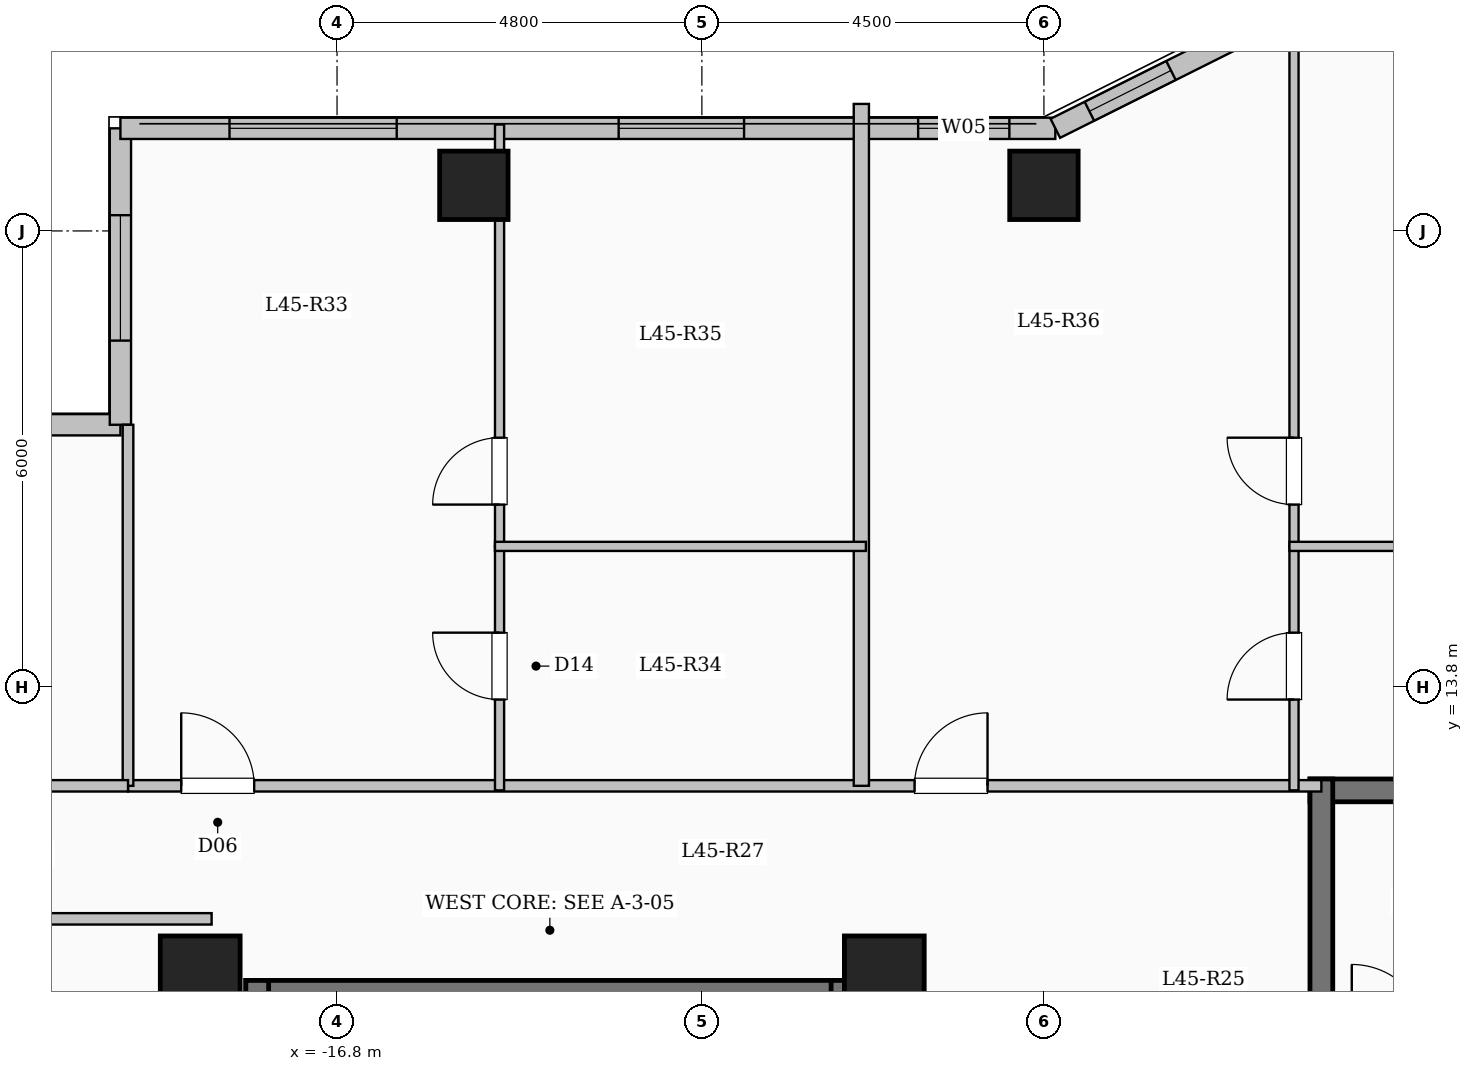
"""IFC4 building model, lengths in metres.
Left out: names, types, materials, properties, quantities, classifications, styles, units other than length and angle.
Written with IfcOpenShell. Run it as: python <this file> out.ifc"""

import sys

from ifc_helpers import new_model, si_unit, direction, frame, frame_2d, origin, origin_2d, place, context, subcontext, project, spatial, rectangle, extrude, element, fill, save


model = new_model("IFC4")
c1 = context("Model", 3, precision=1e-05, world=origin(), true_north=direction((0.0, 1.0)))
c2 = subcontext(c1, "Body", "Model", "MODEL_VIEW")
j1 = project(units=[si_unit("LENGTHUNIT", "METRE"), si_unit("PLANEANGLEUNIT", "RADIAN")], contexts=[c1])
p1 = place(None, origin())
s1 = spatial("IfcSite", under=j1, at=p1, CompositionType="ELEMENT")
p2 = place(p1, origin())
s2 = spatial("IfcBuilding", under=s1, at=p2, CompositionType="ELEMENT")
p3 = place(p2, frame((0.0, 0.0, 166.1)))
s3 = spatial("IfcBuildingStorey", under=s2, at=p3, CompositionType="ELEMENT", Elevation=166.1)
for number, where, z_axis, x_axis in (
    (1, (-9.6, 10.0, 0.0), (0.0, 0.0, 1.0), (1.0, 0.0, 0.0)),
    (2, (-18.6, 10.0, 0.0), (0.0, 0.0, 1.0), (1.0, 0.0, 0.0)),
):
    element("IfcColumn", number, at=place(p3, frame(where, z_axis=z_axis, x_axis=x_axis)), inside=s3, PredefinedType="COLUMN", context=c2, shape_type="SweptSolid", body=[
        extrude(rectangle(XDim=1.05, YDim=1.05, at=origin_2d()), origin(), (0.0, 0.0, 1.0), 3.35),
    ])
for number, where, z_axis, x_axis in (
    (3, (-15.0, 20.4, 0.0), (0.0, 0.0, 1.0), (1.0, 0.0, 0.0)),
    (4, (-7.5, 20.4, 0.0), (0.0, 0.0, 1.0), (1.0, 0.0, 0.0)),
):
    element("IfcColumn", number, at=place(p3, frame(where, z_axis=z_axis, x_axis=x_axis)), inside=s3, PredefinedType="COLUMN", context=c2, shape_type="SweptSolid", body=[
        extrude(rectangle(XDim=0.9, YDim=0.9, at=origin_2d()), origin(), (0.0, 0.0, 1.0), 3.35),
    ])
p4 = place(p3, frame((-25.05, 17.25, 0.0), z_axis=(0.0, 0.0, 1.0), x_axis=(1.0, 0.0, 0.0)))
e5 = element("IfcWall", 5, at=p4, inside=s3, PredefinedType="SOLIDWALL", context=c2, shape_type="SweptSolid", body=[
    extrude(rectangle(XDim=5.4, YDim=0.28, at=frame_2d((2.7, 0.0))), origin(), (0.0, 0.0, 1.0), 3.1),
])
p5 = place(p4, frame((1.725, 0.0, 0.9)))
e6 = element("IfcOpeningElement", 6, at=p5, cuts=e5, PredefinedType="OPENING", context=c2, shape_type="SweptSolid", body=[
    extrude(rectangle(XDim=2.0, YDim=1.7, at=frame_2d((1.0, 0.85))), frame((0.0, 0.15, 0.0), z_axis=(0.0, -1.0, 0.0), x_axis=(1.0, 0.0, 0.0)), (0.0, 0.0, 1.0), 0.3),
])
p6 = place(p3, frame((-19.65, 17.25, 0.0), z_axis=(0.0, 0.0, 1.0), x_axis=(0.0, 1.0, 0.0)))
e7 = element("IfcWall", 7, at=p6, inside=s3, PredefinedType="SOLIDWALL", context=c2, shape_type="SweptSolid", body=[
    extrude(rectangle(XDim=3.9, YDim=0.28, at=frame_2d((1.95, 0.0))), origin(), (0.0, 0.0, 1.0), 3.1),
])
p7 = place(p6, frame((1.107, 0.0, 0.9)))
e8 = element("IfcOpeningElement", 8, at=p7, cuts=e7, PredefinedType="OPENING", context=c2, shape_type="SweptSolid", body=[
    extrude(rectangle(XDim=1.65, YDim=1.6, at=frame_2d((0.825, 0.8))), frame((0.0, 0.15, 0.0), z_axis=(0.0, -1.0, 0.0), x_axis=(1.0, 0.0, 0.0)), (0.0, 0.0, 1.0), 0.3),
])
p8 = place(p3, frame((-19.65, 21.15, 0.0), z_axis=(0.0, 0.0, 1.0), x_axis=(1.0, 0.0, 0.0)))
e9 = element("IfcWall", 9, at=p8, inside=s3, PredefinedType="SOLIDWALL", context=c2, shape_type="SweptSolid", body=[
    extrude(rectangle(XDim=12.3, YDim=0.28, at=frame_2d((6.15, 0.0))), origin(), (0.0, 0.0, 1.0), 3.1),
])
p9 = place(p8, frame((1.435, 0.0, 0.9)))
e10 = element("IfcOpeningElement", 10, at=p9, cuts=e9, PredefinedType="OPENING", context=c2, shape_type="SweptSolid", body=[
    extrude(rectangle(XDim=2.2, YDim=1.75, at=frame_2d((1.1, 0.875))), frame((0.0, 0.15, 0.0), z_axis=(0.0, -1.0, 0.0), x_axis=(1.0, 0.0, 0.0)), (0.0, 0.0, 1.0), 0.3),
])
p10 = place(p8, frame((6.555, 0.0, 0.9)))
e11 = element("IfcOpeningElement", 11, at=p10, cuts=e9, PredefinedType="OPENING", context=c2, shape_type="SweptSolid", body=[
    extrude(rectangle(XDim=1.65, YDim=1.6, at=frame_2d((0.825, 0.8))), frame((0.0, 0.15, 0.0), z_axis=(0.0, -1.0, 0.0), x_axis=(1.0, 0.0, 0.0)), (0.0, 0.0, 1.0), 0.3),
])
p11 = place(p8, frame((10.495, 0.0, 0.95)))
e12 = element("IfcOpeningElement", 12, at=p11, cuts=e9, PredefinedType="OPENING", context=c2, shape_type="SweptSolid", body=[
    extrude(rectangle(XDim=1.2, YDim=1.5, at=frame_2d((0.6, 0.75))), frame((0.0, 0.15, 0.0), z_axis=(0.0, -1.0, 0.0), x_axis=(1.0, 0.0, 0.0)), (0.0, 0.0, 1.0), 0.3),
])
p12 = place(p3, frame((-7.35, 21.15, 0.0), z_axis=(0.0, 0.0, 1.0), x_axis=(0.894427191, 0.4472135955, 0.0)))
e13 = element("IfcWall", 13, at=p12, inside=s3, PredefinedType="SOLIDWALL", context=c2, shape_type="SweptSolid", body=[
    extrude(rectangle(XDim=3.354, YDim=0.28, at=frame_2d((1.677, 0.0))), origin(), (0.0, 0.0, 1.0), 3.1),
])
p13 = place(p12, frame((0.501, 0.0, 0.95)))
e14 = element("IfcOpeningElement", 14, at=p13, cuts=e13, PredefinedType="OPENING", context=c2, shape_type="SweptSolid", body=[
    extrude(rectangle(XDim=1.2, YDim=1.5, at=frame_2d((0.6, 0.75))), frame((0.0, 0.15, 0.0), z_axis=(0.0, -1.0, 0.0), x_axis=(1.0, 0.0, 0.0)), (0.0, 0.0, 1.0), 0.3),
])
p14 = place(p3, frame((-18.0, 9.79, 0.0), z_axis=(0.0, 0.0, 1.0), x_axis=(1.0, 0.0, 0.0)))
e15 = element("IfcWall", 15, at=p14, inside=s3, PredefinedType="SHEAR", context=c2, shape_type="SweptSolid", body=[
    extrude(rectangle(XDim=8.0, YDim=0.3, at=frame_2d((4.0, 0.0))), origin(), (0.0, 0.0, 1.0), 3.35),
])
for number, where, z_axis, x_axis in (
    (16, (-17.85, 6.35, 0.0), (0.0, 0.0, 1.0), (0.0, 1.0, 0.0)),
    (17, (-10.15, 6.35, 0.0), (0.0, 0.0, 1.0), (0.0, 1.0, 0.0)),
):
    element("IfcWall", number, at=place(p3, frame(where, z_axis=z_axis, x_axis=x_axis)), inside=s3, PredefinedType="SHEAR", context=c2, shape_type="SweptSolid", body=[
        extrude(rectangle(XDim=3.59, YDim=0.3, at=frame_2d((1.795, 0.0))), origin(), (0.0, 0.0, 1.0), 3.35),
    ])
p15 = place(p3, frame((-4.0, 12.44, 0.0), z_axis=(0.0, 0.0, 1.0), x_axis=(1.0, 0.0, 0.0)))
e18 = element("IfcWall", 18, at=p15, inside=s3, PredefinedType="SHEAR", context=c2, shape_type="SweptSolid", body=[
    extrude(rectangle(XDim=8.0, YDim=0.3, at=frame_2d((4.0, 0.0))), origin(), (0.0, 0.0, 1.0), 3.35),
])
p16 = place(p3, frame((-3.85, 9.0, 0.0), z_axis=(0.0, 0.0, 1.0), x_axis=(0.0, 1.0, 0.0)))
e19 = element("IfcWall", 19, at=p16, inside=s3, PredefinedType="SHEAR", context=c2, shape_type="SweptSolid", body=[
    extrude(rectangle(XDim=3.59, YDim=0.3, at=frame_2d((1.795, 0.0))), origin(), (0.0, 0.0, 1.0), 3.35),
])
p17 = place(p3, frame((-19.55, 12.5, 0.0), z_axis=(0.0, 0.0, 1.0), x_axis=(1.0, 0.0, 0.0)))
e20 = element("IfcWall", 20, at=p17, inside=s3, PredefinedType="PARTITIONING", context=c2, shape_type="SweptSolid", body=[
    extrude(rectangle(XDim=15.7, YDim=0.15, at=frame_2d((7.85, 0.0))), origin(), (0.0, 0.0, 1.0), 3.1),
])
p18 = place(p17, frame((0.7, 0.0, 0.0)))
e21 = element("IfcOpeningElement", 21, at=p18, cuts=e20, PredefinedType="OPENING", context=c2, shape_type="SweptSolid", body=[
    extrude(rectangle(XDim=0.96, YDim=2.15, at=frame_2d((0.48, 1.075))), frame((0.0, 0.085, 0.0), z_axis=(0.0, -1.0, 0.0), x_axis=(1.0, 0.0, 0.0)), (0.0, 0.0, 1.0), 0.17),
])
p19 = place(p17, frame((10.348, 0.0, 0.0)))
e22 = element("IfcOpeningElement", 22, at=p19, cuts=e20, PredefinedType="OPENING", context=c2, shape_type="SweptSolid", body=[
    extrude(rectangle(XDim=0.96, YDim=2.15, at=frame_2d((0.48, 1.075))), frame((0.0, 0.085, 0.0), z_axis=(0.0, -1.0, 0.0), x_axis=(1.0, 0.0, 0.0)), (0.0, 0.0, 1.0), 0.17),
])
p20 = place(p3, frame((-9.902, 12.5, 0.0), z_axis=(0.0, 0.0, 1.0), x_axis=(0.0, 1.0, 0.0)))
e23 = element("IfcWall", 23, at=p20, inside=s3, PredefinedType="SOLIDWALL", context=c2, shape_type="SweptSolid", body=[
    extrude(rectangle(XDim=8.971, YDim=0.2, at=frame_2d((4.485, 0.0))), origin(), (0.0, 0.0, 1.0), 3.1),
])
p21 = place(p3, frame((-14.662, 12.44, 0.0), z_axis=(0.0, 0.0, 1.0), x_axis=(0.0, 1.0, 0.0)))
e24 = element("IfcWall", 24, at=p21, inside=s3, PredefinedType="PARTITIONING", context=c2, shape_type="SweptSolid", body=[
    extrude(rectangle(XDim=3.21, YDim=0.12, at=frame_2d((1.605, 0.0))), origin(), (0.0, 0.0, 1.0), 3.1),
])
p22 = place(p21, frame((1.195, 0.0, 0.0)))
e25 = element("IfcOpeningElement", 25, at=p22, cuts=e24, PredefinedType="OPENING", context=c2, shape_type="SweptSolid", body=[
    extrude(rectangle(XDim=0.88, YDim=2.1, at=frame_2d((0.44, 1.05))), frame((0.0, 0.07, 0.0), z_axis=(0.0, -1.0, 0.0), x_axis=(1.0, 0.0, 0.0)), (0.0, 0.0, 1.0), 0.14),
])
p23 = place(p3, frame((-14.662, 15.65, 0.0), z_axis=(0.0, 0.0, 1.0), x_axis=(0.0, 1.0, 0.0)))
e26 = element("IfcWall", 26, at=p23, inside=s3, PredefinedType="PARTITIONING", context=c2, shape_type="SweptSolid", body=[
    extrude(rectangle(XDim=5.55, YDim=0.12, at=frame_2d((2.775, 0.0))), origin(), (0.0, 0.0, 1.0), 3.1),
])
p24 = place(p23, frame((0.55, 0.0, 0.0)))
e27 = element("IfcOpeningElement", 27, at=p24, cuts=e26, PredefinedType="OPENING", context=c2, shape_type="SweptSolid", body=[
    extrude(rectangle(XDim=0.88, YDim=2.1, at=frame_2d((0.44, 1.05))), frame((0.0, 0.07, 0.0), z_axis=(0.0, -1.0, 0.0), x_axis=(1.0, 0.0, 0.0)), (0.0, 0.0, 1.0), 0.14),
])
p25 = place(p3, frame((-14.722, 15.65, 0.0), z_axis=(0.0, 0.0, 1.0), x_axis=(1.0, 0.0, 0.0)))
e28 = element("IfcWall", 28, at=p25, inside=s3, PredefinedType="PARTITIONING", context=c2, shape_type="SweptSolid", body=[
    extrude(rectangle(XDim=4.88, YDim=0.12, at=frame_2d((2.44, 0.0))), origin(), (0.0, 0.0, 1.0), 2.685),
])
p26 = place(p3, frame((-4.21, 12.44, 0.0), z_axis=(0.0, 0.0, 1.0), x_axis=(0.0, 1.0, 0.0)))
e29 = element("IfcWall", 29, at=p26, inside=s3, PredefinedType="PARTITIONING", context=c2, shape_type="SweptSolid", body=[
    extrude(rectangle(XDim=3.21, YDim=0.12, at=frame_2d((1.605, 0.0))), origin(), (0.0, 0.0, 1.0), 3.1),
])
p27 = place(p26, frame((1.195, 0.0, 0.0)))
e30 = element("IfcOpeningElement", 30, at=p27, cuts=e29, PredefinedType="OPENING", context=c2, shape_type="SweptSolid", body=[
    extrude(rectangle(XDim=0.88, YDim=2.1, at=frame_2d((0.44, 1.05))), frame((0.0, 0.07, 0.0), z_axis=(0.0, -1.0, 0.0), x_axis=(1.0, 0.0, 0.0)), (0.0, 0.0, 1.0), 0.14),
])
p28 = place(p3, frame((-4.21, 15.65, 0.0), z_axis=(0.0, 0.0, 1.0), x_axis=(0.0, 1.0, 0.0)))
e31 = element("IfcWall", 31, at=p28, inside=s3, PredefinedType="PARTITIONING", context=c2, shape_type="SweptSolid", body=[
    extrude(rectangle(XDim=7.03, YDim=0.12, at=frame_2d((3.515, 0.0))), origin(), (0.0, 0.0, 1.0), 3.1),
])
p29 = place(p28, frame((0.55, 0.0, 0.0)))
e32 = element("IfcOpeningElement", 32, at=p29, cuts=e31, PredefinedType="OPENING", context=c2, shape_type="SweptSolid", body=[
    extrude(rectangle(XDim=0.88, YDim=2.1, at=frame_2d((0.44, 1.05))), frame((0.0, 0.07, 0.0), z_axis=(0.0, -1.0, 0.0), x_axis=(1.0, 0.0, 0.0)), (0.0, 0.0, 1.0), 0.14),
])
p30 = place(p3, frame((-4.27, 15.65, 0.0), z_axis=(0.0, 0.0, 1.0), x_axis=(1.0, 0.0, 0.0)))
e33 = element("IfcWall", 33, at=p30, inside=s3, PredefinedType="PARTITIONING", context=c2, shape_type="SweptSolid", body=[
    extrude(rectangle(XDim=4.88, YDim=0.12, at=frame_2d((2.44, 0.0))), origin(), (0.0, 0.0, 1.0), 2.685),
])
p31 = place(p3, frame((-25.08, 10.75, 0.0), z_axis=(0.0, 0.0, 1.0), x_axis=(1.0, 0.0, 0.0)))
e34 = element("IfcWall", 34, at=p31, inside=s3, PredefinedType="PARTITIONING", context=c2, shape_type="SweptSolid", body=[
    extrude(rectangle(XDim=6.63, YDim=0.15, at=frame_2d((3.315, 0.0))), origin(), (0.0, 0.0, 1.0), 3.1),
])
p32 = place(p3, frame((-19.55, 12.5, 0.0), z_axis=(0.0, 0.0, 1.0), x_axis=(0.0, 1.0, 0.0)))
e35 = element("IfcWall", 35, at=p32, inside=s3, PredefinedType="PARTITIONING", context=c2, shape_type="SweptSolid", body=[
    extrude(rectangle(XDim=4.75, YDim=0.14, at=frame_2d((2.375, 0.0))), origin(), (0.0, 0.0, 1.0), 3.1),
])
p33 = place(p3, frame((-25.08, 12.5, 0.0), z_axis=(0.0, 0.0, 1.0), x_axis=(1.0, 0.0, 0.0)))
e36 = element("IfcWall", 36, at=p33, inside=s3, PredefinedType="PARTITIONING", context=c2, shape_type="SweptSolid", body=[
    extrude(rectangle(XDim=5.53, YDim=0.15, at=frame_2d((2.765, 0.0))), origin(), (0.0, 0.0, 1.0), 3.1),
])
p34 = place(p33, frame((2.29, 0.0, 0.0)))
e37 = element("IfcOpeningElement", 37, at=p34, cuts=e36, PredefinedType="OPENING", context=c2, shape_type="SweptSolid", body=[
    extrude(rectangle(XDim=0.95, YDim=2.15, at=frame_2d((0.475, 1.075))), frame((0.0, 0.085, 0.0), z_axis=(0.0, -1.0, 0.0), x_axis=(1.0, 0.0, 0.0)), (0.0, 0.0, 1.0), 0.17),
])
p35 = place(p7, origin())
e38 = element("IfcWindow", 38, at=p35, inside=s3, PartitioningType="SINGLE_PANEL", PredefinedType="WINDOW", context=c2, shape_type="SweptSolid", body=[
    extrude(rectangle(XDim=1.65, YDim=1.6, at=frame_2d((0.825, 0.8))), frame((0.0, 0.03, 0.0), z_axis=(0.0, -1.0, 0.0), x_axis=(1.0, 0.0, 0.0)), (0.0, 0.0, 1.0), 0.06),
])
fill(e8, e38)
p36 = place(p9, origin())
e39 = element("IfcWindow", 39, at=p36, inside=s3, PartitioningType="SINGLE_PANEL", PredefinedType="WINDOW", context=c2, shape_type="SweptSolid", body=[
    extrude(rectangle(XDim=2.2, YDim=1.75, at=frame_2d((1.1, 0.875))), frame((0.0, 0.03, 0.0), z_axis=(0.0, -1.0, 0.0), x_axis=(1.0, 0.0, 0.0)), (0.0, 0.0, 1.0), 0.06),
])
fill(e10, e39)
p37 = place(p10, origin())
e40 = element("IfcWindow", 40, at=p37, inside=s3, PartitioningType="SINGLE_PANEL", PredefinedType="WINDOW", context=c2, shape_type="SweptSolid", body=[
    extrude(rectangle(XDim=1.65, YDim=1.6, at=frame_2d((0.825, 0.8))), frame((0.0, 0.03, 0.0), z_axis=(0.0, -1.0, 0.0), x_axis=(1.0, 0.0, 0.0)), (0.0, 0.0, 1.0), 0.06),
])
fill(e11, e40)
p38 = place(p11, origin())
e41 = element("IfcWindow", 41, at=p38, inside=s3, PartitioningType="SINGLE_PANEL", PredefinedType="WINDOW", context=c2, shape_type="SweptSolid", body=[
    extrude(rectangle(XDim=1.2, YDim=1.5, at=frame_2d((0.6, 0.75))), frame((0.0, 0.03, 0.0), z_axis=(0.0, -1.0, 0.0), x_axis=(1.0, 0.0, 0.0)), (0.0, 0.0, 1.0), 0.06),
])
fill(e12, e41)
p39 = place(p13, origin())
e42 = element("IfcWindow", 42, at=p39, inside=s3, PartitioningType="SINGLE_PANEL", PredefinedType="WINDOW", context=c2, shape_type="SweptSolid", body=[
    extrude(rectangle(XDim=1.2, YDim=1.5, at=frame_2d((0.6, 0.75))), frame((0.0, 0.03, 0.0), z_axis=(0.0, -1.0, 0.0), x_axis=(1.0, 0.0, 0.0)), (0.0, 0.0, 1.0), 0.06),
])
fill(e14, e42)
p40 = place(p18, origin())
e43 = element("IfcDoor", 43, at=p40, inside=s3, OperationType="SINGLE_SWING_LEFT", PredefinedType="DOOR", context=c2, shape_type="SweptSolid", body=[
    extrude(rectangle(XDim=0.96, YDim=2.15, at=frame_2d((0.48, 1.075))), frame((0.0, 0.025, 0.0), z_axis=(0.0, -1.0, 0.0), x_axis=(1.0, 0.0, 0.0)), (0.0, 0.0, 1.0), 0.05),
])
fill(e21, e43)
p41 = place(p22, origin())
e44 = element("IfcDoor", 44, at=p41, inside=s3, OperationType="SINGLE_SWING_RIGHT", PredefinedType="DOOR", context=c2, shape_type="SweptSolid", body=[
    extrude(rectangle(XDim=0.88, YDim=2.1, at=frame_2d((0.44, 1.05))), frame((0.0, 0.025, 0.0), z_axis=(0.0, -1.0, 0.0), x_axis=(1.0, 0.0, 0.0)), (0.0, 0.0, 1.0), 0.05),
])
fill(e25, e44)
p42 = place(p24, origin())
e45 = element("IfcDoor", 45, at=p42, inside=s3, OperationType="SINGLE_SWING_LEFT", PredefinedType="DOOR", context=c2, shape_type="SweptSolid", body=[
    extrude(rectangle(XDim=0.88, YDim=2.1, at=frame_2d((0.44, 1.05))), frame((0.0, 0.025, 0.0), z_axis=(0.0, -1.0, 0.0), x_axis=(1.0, 0.0, 0.0)), (0.0, 0.0, 1.0), 0.05),
])
fill(e27, e45)
p43 = place(p19, origin())
e46 = element("IfcDoor", 46, at=p43, inside=s3, OperationType="SINGLE_SWING_RIGHT", PredefinedType="DOOR", context=c2, shape_type="SweptSolid", body=[
    extrude(rectangle(XDim=0.96, YDim=2.15, at=frame_2d((0.48, 1.075))), frame((0.0, 0.025, 0.0), z_axis=(0.0, -1.0, 0.0), x_axis=(1.0, 0.0, 0.0)), (0.0, 0.0, 1.0), 0.05),
])
fill(e22, e46)
p44 = place(p27, origin())
e47 = element("IfcDoor", 47, at=p44, inside=s3, OperationType="SINGLE_SWING_LEFT", PredefinedType="DOOR", context=c2, shape_type="SweptSolid", body=[
    extrude(rectangle(XDim=0.88, YDim=2.1, at=frame_2d((0.44, 1.05))), frame((0.0, 0.025, 0.0), z_axis=(0.0, -1.0, 0.0), x_axis=(1.0, 0.0, 0.0)), (0.0, 0.0, 1.0), 0.05),
])
fill(e30, e47)
p45 = place(p29, origin())
e48 = element("IfcDoor", 48, at=p45, inside=s3, OperationType="SINGLE_SWING_RIGHT", PredefinedType="DOOR", context=c2, shape_type="SweptSolid", body=[
    extrude(rectangle(XDim=0.88, YDim=2.1, at=frame_2d((0.44, 1.05))), frame((0.0, 0.025, 0.0), z_axis=(0.0, -1.0, 0.0), x_axis=(1.0, 0.0, 0.0)), (0.0, 0.0, 1.0), 0.05),
])
fill(e32, e48)
save(model, sys.argv[1])
